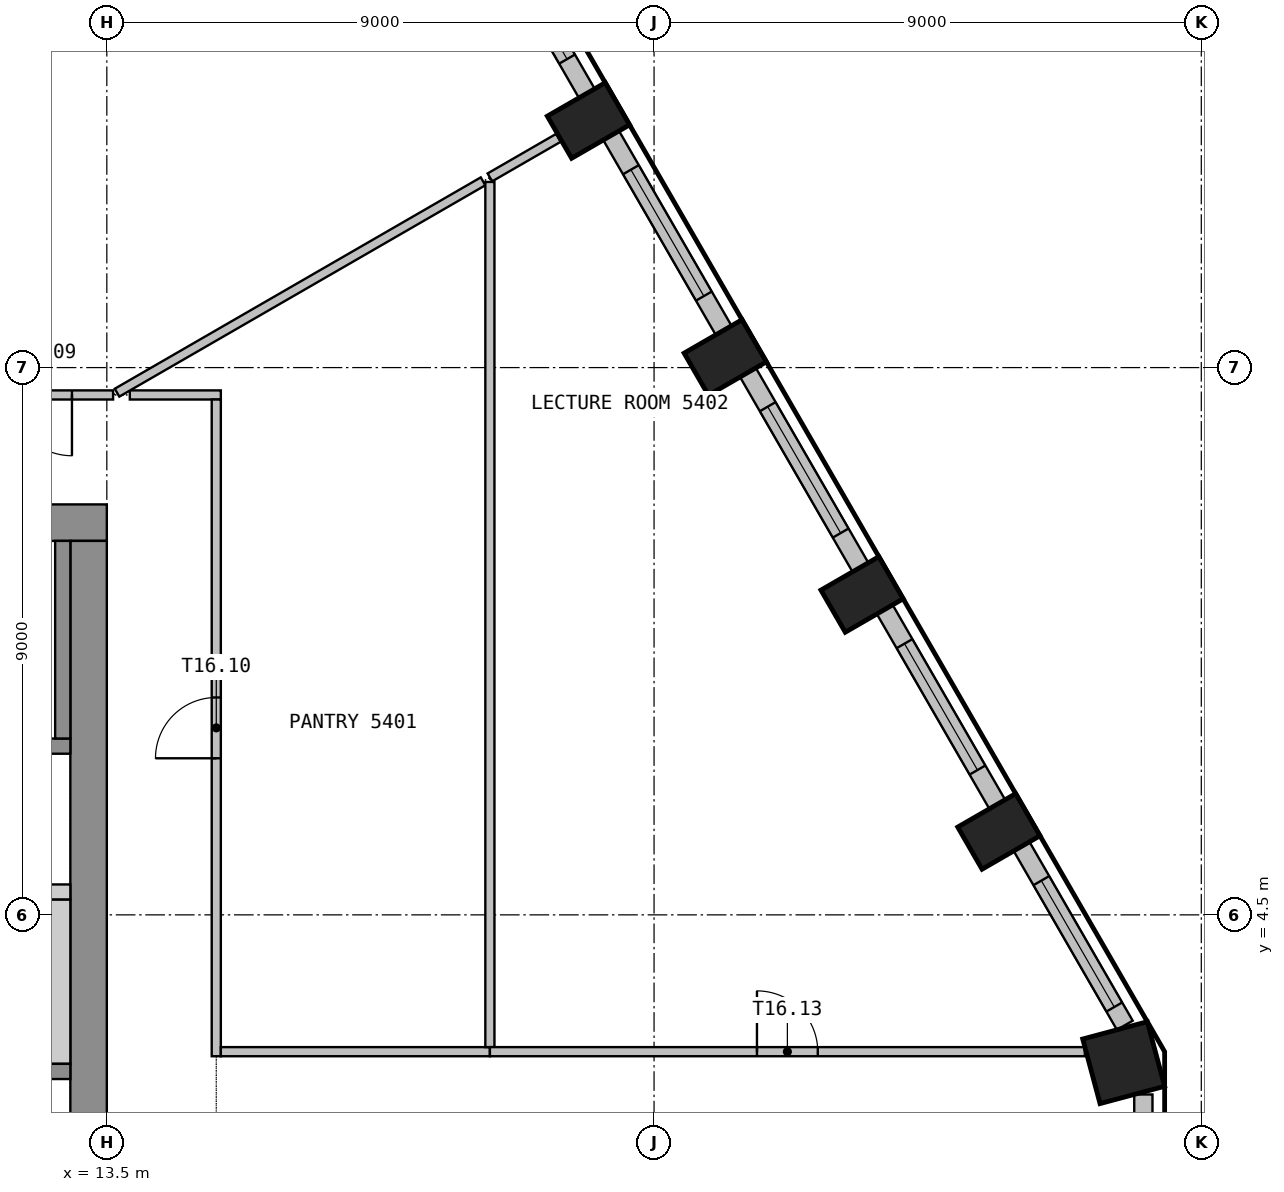
"""IFC4 building model, lengths in metres.
Left out: names, types, materials, properties, quantities, classifications, styles, units other than length and angle.
Written with IfcOpenShell. Run it as: python <this file> out.ifc"""

import sys

from ifc_helpers import new_model, si_unit, direction, frame, frame_2d, origin, origin_2d, place, context, subcontext, project, spatial, polyline, rectangle, outline, extrude, element, fill, save


model = new_model("IFC4")
c1 = context("Model", 3, precision=1e-05, world=origin(), true_north=direction((0.0, 1.0)))
c2 = subcontext(c1, "Body", "Model", "MODEL_VIEW")
j1 = project(units=[si_unit("LENGTHUNIT", "METRE"), si_unit("PLANEANGLEUNIT", "RADIAN")], contexts=[c1])
p1 = place(None, origin())
s1 = spatial("IfcSite", under=j1, at=p1, CompositionType="ELEMENT")
p2 = place(p1, origin())
s2 = spatial("IfcBuilding", under=s1, at=p2, CompositionType="ELEMENT")
p3 = place(p2, frame((0.0, 0.0, 219.0)))
s3 = spatial("IfcBuildingStorey", under=s2, at=p3, CompositionType="ELEMENT", Elevation=219.0)
p4 = place(p3, frame((30.223, 2.07, 0.0), z_axis=(0.0, 0.0, 1.0), x_axis=(-0.258819045103, 0.965925826289, 0.0)))
e1 = element("IfcColumn", 1, at=p4, inside=s3, PredefinedType="COLUMN", context=c2, shape_type="SweptSolid", body=[
    extrude(rectangle(XDim=1.1, YDim=1.1, at=origin_2d()), origin(), (0.0, 0.0, 1.0), 3.55),
])
for number, where, z_axis, x_axis in (
    (2, (28.171, 5.872, 0.0), (0.0, 0.0, 1.0), (-0.5, 0.866, 0.0)),
    (3, (25.921, 9.769, 0.0), (0.0, 0.0, 1.0), (-0.5, 0.866, 0.0)),
    (4, (23.671, 13.666, 0.0), (0.0, 0.0, 1.0), (-0.5, 0.866, 0.0)),
    (5, (21.421, 17.563, 0.0), (0.0, 0.0, 1.0), (-0.5, 0.866, 0.0)),
):
    element("IfcColumn", number, at=place(p3, frame(where, z_axis=z_axis, x_axis=x_axis)), inside=s3, PredefinedType="COLUMN", context=c2, shape_type="SweptSolid", body=[
        extrude(rectangle(XDim=0.8, YDim=1.1, at=origin_2d()), origin(), (0.0, 0.0, 1.0), 3.55),
    ])
p5 = place(p3, frame((30.547, -1.546, 0.0), z_axis=(0.0, 0.0, 1.0), x_axis=(0.0, 1.0, 0.0)))
e6 = element("IfcWall", 6, at=p5, inside=s3, PredefinedType="SOLIDWALL", context=c2, shape_type="SweptSolid", body=[
    extrude(rectangle(XDim=3.093, YDim=0.3, at=frame_2d((1.546, 0.0))), origin(), (0.0, 0.0, 1.0), 3.55),
])
p6 = place(p5, frame((0.346, 0.0, 0.9)))
e7 = element("IfcOpeningElement", 7, at=p6, cuts=e6, PredefinedType="OPENING", context=c2, shape_type="SweptSolid", body=[
    extrude(rectangle(XDim=2.4, YDim=2.1, at=frame_2d((1.2, 1.05))), frame((0.0, 0.16, 0.0), z_axis=(0.0, -1.0, 0.0), x_axis=(1.0, 0.0, 0.0)), (0.0, 0.0, 1.0), 0.32),
])
p7 = place(p3, frame((30.242, 2.684, 0.0), z_axis=(0.0, 0.0, 1.0), x_axis=(-0.500012868213, 0.866017974191, 0.0)))
e8 = element("IfcWall", 8, at=p7, inside=s3, PredefinedType="SOLIDWALL", context=c2, shape_type="SweptSolid", body=[
    extrude(rectangle(XDim=3.396, YDim=0.3, at=frame_2d((1.698, 0.0))), origin(), (0.0, 0.0, 1.0), 3.55),
])
p8 = place(p7, frame((0.346, 0.0, 0.9)))
e9 = element("IfcOpeningElement", 9, at=p8, cuts=e8, PredefinedType="OPENING", context=c2, shape_type="SweptSolid", body=[
    extrude(rectangle(XDim=2.4, YDim=2.1, at=frame_2d((1.2, 1.05))), frame((0.0, 0.16, 0.0), z_axis=(0.0, -1.0, 0.0), x_axis=(1.0, 0.0, 0.0)), (0.0, 0.0, 1.0), 0.32),
])
p9 = place(p3, frame((28.144, 6.319, 0.0), z_axis=(0.0, 0.0, 1.0), x_axis=(-0.500029062817, 0.866008623709, 0.0)))
e10 = element("IfcWall", 10, at=p9, inside=s3, PredefinedType="SOLIDWALL", context=c2, shape_type="SweptSolid", body=[
    extrude(rectangle(XDim=3.699, YDim=0.3, at=frame_2d((1.85, 0.0))), origin(), (0.0, 0.0, 1.0), 3.55),
])
p10 = place(p9, frame((0.649, 0.0, 0.9)))
e11 = element("IfcOpeningElement", 11, at=p10, cuts=e10, PredefinedType="OPENING", context=c2, shape_type="SweptSolid", body=[
    extrude(rectangle(XDim=2.4, YDim=2.1, at=frame_2d((1.2, 1.05))), frame((0.0, 0.16, 0.0), z_axis=(0.0, -1.0, 0.0), x_axis=(1.0, 0.0, 0.0)), (0.0, 0.0, 1.0), 0.32),
])
p11 = place(p3, frame((25.894, 10.216, 0.0), z_axis=(0.0, 0.0, 1.0), x_axis=(-0.500029062817, 0.866008623709, 0.0)))
e12 = element("IfcWall", 12, at=p11, inside=s3, PredefinedType="SOLIDWALL", context=c2, shape_type="SweptSolid", body=[
    extrude(rectangle(XDim=3.699, YDim=0.3, at=frame_2d((1.85, 0.0))), origin(), (0.0, 0.0, 1.0), 3.55),
])
p12 = place(p11, frame((0.649, 0.0, 0.9)))
e13 = element("IfcOpeningElement", 13, at=p12, cuts=e12, PredefinedType="OPENING", context=c2, shape_type="SweptSolid", body=[
    extrude(rectangle(XDim=2.4, YDim=2.1, at=frame_2d((1.2, 1.05))), frame((0.0, 0.16, 0.0), z_axis=(0.0, -1.0, 0.0), x_axis=(1.0, 0.0, 0.0)), (0.0, 0.0, 1.0), 0.32),
])
p13 = place(p3, frame((23.644, 14.113, 0.0), z_axis=(0.0, 0.0, 1.0), x_axis=(-0.500029062817, 0.866008623709, 0.0)))
e14 = element("IfcWall", 14, at=p13, inside=s3, PredefinedType="SOLIDWALL", context=c2, shape_type="SweptSolid", body=[
    extrude(rectangle(XDim=3.699, YDim=0.3, at=frame_2d((1.85, 0.0))), origin(), (0.0, 0.0, 1.0), 3.55),
])
p14 = place(p13, frame((0.649, 0.0, 0.9)))
e15 = element("IfcOpeningElement", 15, at=p14, cuts=e14, PredefinedType="OPENING", context=c2, shape_type="SweptSolid", body=[
    extrude(rectangle(XDim=2.4, YDim=2.1, at=frame_2d((1.2, 1.05))), frame((0.0, 0.16, 0.0), z_axis=(0.0, -1.0, 0.0), x_axis=(1.0, 0.0, 0.0)), (0.0, 0.0, 1.0), 0.32),
])
p15 = place(p3, frame((21.394, 18.01, 0.0), z_axis=(0.0, 0.0, 1.0), x_axis=(-0.500012868213, 0.866017974191, 0.0)))
e16 = element("IfcWall", 16, at=p15, inside=s3, PredefinedType="SOLIDWALL", context=c2, shape_type="SweptSolid", body=[
    extrude(rectangle(XDim=3.396, YDim=0.3, at=frame_2d((1.698, 0.0))), origin(), (0.0, 0.0, 1.0), 3.55),
])
p16 = place(p15, frame((0.649, 0.0, 0.9)))
e17 = element("IfcOpeningElement", 17, at=p16, cuts=e16, PredefinedType="OPENING", context=c2, shape_type="SweptSolid", body=[
    extrude(rectangle(XDim=2.4, YDim=2.1, at=frame_2d((1.2, 1.05))), frame((0.0, 0.16, 0.0), z_axis=(0.0, -1.0, 0.0), x_axis=(1.0, 0.0, 0.0)), (0.0, 0.0, 1.0), 0.32),
])
p17 = place(p3, frame((-13.5, 10.95, 0.0), z_axis=(0.0, 0.0, 1.0), x_axis=(1.0, 0.0, 0.0)))
e18 = element("IfcWall", 18, at=p17, inside=s3, PredefinedType="SHEAR", context=c2, shape_type="SweptSolid", body=[
    extrude(rectangle(XDim=27.0, YDim=0.6, at=frame_2d((13.5, 0.0))), origin(), (0.0, 0.0, 1.0), 3.55),
])
p18 = place(p17, frame((12.3, 0.0, 0.0)))
e19 = element("IfcOpeningElement", 19, at=p18, cuts=e18, PredefinedType="OPENING", context=c2, shape_type="SweptSolid", body=[
    extrude(rectangle(XDim=2.4, YDim=2.1, at=frame_2d((1.2, 1.05))), frame((0.0, 0.31, 0.0), z_axis=(0.0, -1.0, 0.0), x_axis=(1.0, 0.0, 0.0)), (0.0, 0.0, 1.0), 0.62),
])
p19 = place(p17, frame((1.05, 0.0, 0.0)))
e20 = element("IfcOpeningElement", 20, at=p19, cuts=e18, PredefinedType="OPENING", context=c2, shape_type="SweptSolid", body=[
    extrude(rectangle(XDim=1.2, YDim=2.1, at=frame_2d((0.6, 1.05))), frame((0.0, 0.31, 0.0), z_axis=(0.0, -1.0, 0.0), x_axis=(1.0, 0.0, 0.0)), (0.0, 0.0, 1.0), 0.62),
])
p20 = place(p17, frame((24.75, 0.0, 0.0)))
e21 = element("IfcOpeningElement", 21, at=p20, cuts=e18, PredefinedType="OPENING", context=c2, shape_type="SweptSolid", body=[
    extrude(rectangle(XDim=1.2, YDim=2.1, at=frame_2d((0.6, 1.05))), frame((0.0, 0.31, 0.0), z_axis=(0.0, -1.0, 0.0), x_axis=(1.0, 0.0, 0.0)), (0.0, 0.0, 1.0), 0.62),
])
p21 = place(p3, frame((13.2, -10.65, 0.0), z_axis=(0.0, 0.0, 1.0), x_axis=(0.0, 1.0, 0.0)))
e22 = element("IfcWall", 22, at=p21, inside=s3, PredefinedType="SHEAR", context=c2, shape_type="SweptSolid", body=[
    extrude(rectangle(XDim=21.3, YDim=0.6, at=frame_2d((10.65, 0.0))), origin(), (0.0, 0.0, 1.0), 3.55),
])
p22 = place(p21, frame((9.45, 0.0, 0.0)))
e23 = element("IfcOpeningElement", 23, at=p22, cuts=e22, PredefinedType="OPENING", context=c2, shape_type="SweptSolid", body=[
    extrude(rectangle(XDim=2.4, YDim=2.1, at=frame_2d((1.2, 1.05))), frame((0.0, 0.31, 0.0), z_axis=(0.0, -1.0, 0.0), x_axis=(1.0, 0.0, 0.0)), (0.0, 0.0, 1.0), 0.62),
])
p23 = place(p3, origin())
e24 = element("IfcWall", 24, at=p23, inside=s3, PredefinedType="SHEAR", context=c2, shape_type="SweptSolid", body=[
    extrude(outline(polyline([(4.075, 4.75), (12.9, 4.75), (12.9, 5.0), (4.075, 5.0), (4.075, 4.75)])), origin(), (0.0, 0.0, 1.0), 3.55),
])
p24 = place(p3, origin())
e25 = element("IfcWall", 25, at=p24, inside=s3, PredefinedType="SHEAR", context=c2, shape_type="SweptSolid", body=[
    extrude(outline(polyline([(12.475, 2.05), (12.9, 2.05), (12.9, 4.75), (12.475, 4.75), (12.475, 2.05)])), origin(), (0.0, 0.0, 1.0), 3.55),
])
p25 = place(p3, frame((9.675, 1.925, 0.0), z_axis=(0.0, 0.0, 1.0), x_axis=(1.0, 0.0, 0.0)))
e26 = element("IfcWall", 26, at=p25, inside=s3, PredefinedType="SHEAR", context=c2, shape_type="SweptSolid", body=[
    extrude(rectangle(XDim=3.225, YDim=0.25, at=frame_2d((1.612, 0.0))), origin(), (0.0, 0.0, 1.0), 3.55),
])
p26 = place(p25, frame((0.925, 0.0, 0.0)))
e27 = element("IfcOpeningElement", 27, at=p26, cuts=e26, PredefinedType="OPENING", context=c2, shape_type="SweptSolid", body=[
    extrude(rectangle(XDim=1.2, YDim=2.1, at=frame_2d((0.6, 1.05))), frame((0.0, 0.135, 0.0), z_axis=(0.0, -1.0, 0.0), x_axis=(1.0, 0.0, 0.0)), (0.0, 0.0, 1.0), 0.27),
])
p27 = place(p3, frame((2.8, 7.275, 0.0), z_axis=(0.0, 0.0, 1.0), x_axis=(1.0, 0.0, 0.0)))
e28 = element("IfcWall", 28, at=p27, inside=s3, PredefinedType="SHEAR", context=c2, shape_type="SweptSolid", body=[
    extrude(rectangle(XDim=10.1, YDim=0.25, at=frame_2d((5.05, 0.0))), origin(), (0.0, 0.0, 1.0), 3.55),
])
p28 = place(p27, frame((8.45, 0.0, 0.0)))
e29 = element("IfcOpeningElement", 29, at=p28, cuts=e28, PredefinedType="OPENING", context=c2, shape_type="SweptSolid", body=[
    extrude(rectangle(XDim=1.2, YDim=2.1, at=frame_2d((0.6, 1.05))), frame((0.0, 0.135, 0.0), z_axis=(0.0, -1.0, 0.0), x_axis=(1.0, 0.0, 0.0)), (0.0, 0.0, 1.0), 0.27),
])
p29 = place(p3, frame((12.775, 7.4, 0.0), z_axis=(0.0, 0.0, 1.0), x_axis=(0.0, 1.0, 0.0)))
e30 = element("IfcWall", 30, at=p29, inside=s3, PredefinedType="SHEAR", context=c2, shape_type="SweptSolid", body=[
    extrude(rectangle(XDim=3.25, YDim=0.25, at=frame_2d((1.625, 0.0))), origin(), (0.0, 0.0, 1.0), 3.55),
])
p30 = place(p3, frame((13.603, 13.05, 0.0), z_axis=(0.0, 0.0, 1.0), x_axis=(-1.0, 0.0, 0.0)))
e31 = element("IfcWall", 31, at=p30, inside=s3, PredefinedType="PARTITIONING", context=c2, shape_type="SweptSolid", body=[
    extrude(rectangle(XDim=2.353, YDim=0.15, at=frame_2d((1.177, 0.0))), origin(), (0.0, 0.0, 1.0), 3.55),
])
p31 = place(p30, frame((0.677, 0.0, 0.0)))
e32 = element("IfcOpeningElement", 32, at=p31, cuts=e31, PredefinedType="OPENING", context=c2, shape_type="SweptSolid", body=[
    extrude(rectangle(XDim=1.0, YDim=2.1, at=frame_2d((0.5, 1.05))), frame((0.0, 0.085, 0.0), z_axis=(0.0, -1.0, 0.0), x_axis=(1.0, 0.0, 0.0)), (0.0, 0.0, 1.0), 0.17),
])
p32 = place(p3, frame((15.375, 13.05, 0.0), z_axis=(0.0, 0.0, 1.0), x_axis=(-1.0, 0.0, 0.0)))
e33 = element("IfcWall", 33, at=p32, inside=s3, PredefinedType="PARTITIONING", context=c2, shape_type="SweptSolid", body=[
    extrude(rectangle(XDim=1.497, YDim=0.15, at=frame_2d((0.749, 0.0))), origin(), (0.0, 0.0, 1.0), 3.55),
])
p33 = place(p3, frame((19.688, 16.563, 0.0), z_axis=(0.0, 0.0, 1.0), x_axis=(-0.866012448988, -0.500022437694, 0.0)))
e34 = element("IfcWall", 34, at=p33, inside=s3, PredefinedType="PARTITIONING", context=c2, shape_type="SweptSolid", body=[
    extrude(rectangle(XDim=6.951, YDim=0.15, at=frame_2d((3.476, 0.0))), origin(), (0.0, 0.0, 1.0), 3.55),
])
p34 = place(p3, frame((15.3, 2.175, 0.0), z_axis=(0.0, 0.0, 1.0), x_axis=(0.0, 1.0, 0.0)))
e35 = element("IfcWall", 35, at=p34, inside=s3, PredefinedType="PARTITIONING", context=c2, shape_type="SweptSolid", body=[
    extrude(rectangle(XDim=10.8, YDim=0.15, at=frame_2d((5.4, 0.0))), origin(), (0.0, 0.0, 1.0), 3.55),
])
p35 = place(p34, frame((4.9, 0.0, 0.0)))
e36 = element("IfcOpeningElement", 36, at=p35, cuts=e35, PredefinedType="OPENING", context=c2, shape_type="SweptSolid", body=[
    extrude(rectangle(XDim=1.0, YDim=2.1, at=frame_2d((0.5, 1.05))), frame((0.0, 0.085, 0.0), z_axis=(0.0, -1.0, 0.0), x_axis=(1.0, 0.0, 0.0)), (0.0, 0.0, 1.0), 0.17),
])
p36 = place(p3, frame((15.375, 2.25, 0.0), z_axis=(0.0, 0.0, 1.0), x_axis=(1.0, 0.0, 0.0)))
e37 = element("IfcWall", 37, at=p36, inside=s3, PredefinedType="PARTITIONING", context=c2, shape_type="SweptSolid", body=[
    extrude(rectangle(XDim=4.425, YDim=0.15, at=frame_2d((2.212, 0.0))), origin(), (0.0, 0.0, 1.0), 3.55),
])
p37 = place(p3, frame((19.8, 16.553, 0.0), z_axis=(0.0, 0.0, 1.0), x_axis=(0.0, -1.0, 0.0)))
e38 = element("IfcWall", 38, at=p37, inside=s3, PredefinedType="PARTITIONING", context=c2, shape_type="SweptSolid", body=[
    extrude(rectangle(XDim=14.228, YDim=0.15, at=frame_2d((7.114, 0.0))), origin(), (0.0, 0.0, 1.0), 3.55),
])
p38 = place(p3, frame((19.8, 2.25, 0.0), z_axis=(0.0, 0.0, 1.0), x_axis=(1.0, 0.0, 0.0)))
e39 = element("IfcWall", 39, at=p38, inside=s3, PredefinedType="PARTITIONING", context=c2, shape_type="SweptSolid", body=[
    extrude(rectangle(XDim=9.785, YDim=0.15, at=frame_2d((4.893, 0.0))), origin(), (0.0, 0.0, 1.0), 3.55),
])
p39 = place(p38, frame((4.393, 0.0, 0.0)))
e40 = element("IfcOpeningElement", 40, at=p39, cuts=e39, PredefinedType="OPENING", context=c2, shape_type="SweptSolid", body=[
    extrude(rectangle(XDim=1.0, YDim=2.1, at=frame_2d((0.5, 1.05))), frame((0.0, 0.085, 0.0), z_axis=(0.0, -1.0, 0.0), x_axis=(1.0, 0.0, 0.0)), (0.0, 0.0, 1.0), 0.17),
])
p40 = place(p3, frame((20.927, 17.278, 0.0), z_axis=(0.0, 0.0, 1.0), x_axis=(-0.866157475642, -0.499771175029, 0.0)))
e41 = element("IfcWall", 41, at=p40, inside=s3, PredefinedType="MOVABLE", context=c2, shape_type="SweptSolid", body=[
    extrude(rectangle(XDim=1.301, YDim=0.15, at=frame_2d((0.651, 0.0))), origin(), (0.0, 0.0, 1.0), 3.55),
])
p41 = place(p8, origin())
e42 = element("IfcWindow", 42, at=p41, inside=s3, PartitioningType="SINGLE_PANEL", PredefinedType="WINDOW", context=c2, shape_type="SweptSolid", body=[
    extrude(rectangle(XDim=2.4, YDim=2.1, at=frame_2d((1.2, 1.05))), frame((0.0, 0.03, 0.0), z_axis=(0.0, -1.0, 0.0), x_axis=(1.0, 0.0, 0.0)), (0.0, 0.0, 1.0), 0.06),
])
fill(e9, e42)
p42 = place(p10, origin())
e43 = element("IfcWindow", 43, at=p42, inside=s3, PartitioningType="SINGLE_PANEL", PredefinedType="WINDOW", context=c2, shape_type="SweptSolid", body=[
    extrude(rectangle(XDim=2.4, YDim=2.1, at=frame_2d((1.2, 1.05))), frame((0.0, 0.03, 0.0), z_axis=(0.0, -1.0, 0.0), x_axis=(1.0, 0.0, 0.0)), (0.0, 0.0, 1.0), 0.06),
])
fill(e11, e43)
p43 = place(p12, origin())
e44 = element("IfcWindow", 44, at=p43, inside=s3, PartitioningType="SINGLE_PANEL", PredefinedType="WINDOW", context=c2, shape_type="SweptSolid", body=[
    extrude(rectangle(XDim=2.4, YDim=2.1, at=frame_2d((1.2, 1.05))), frame((0.0, 0.03, 0.0), z_axis=(0.0, -1.0, 0.0), x_axis=(1.0, 0.0, 0.0)), (0.0, 0.0, 1.0), 0.06),
])
fill(e13, e44)
p44 = place(p14, origin())
e45 = element("IfcWindow", 45, at=p44, inside=s3, PartitioningType="SINGLE_PANEL", PredefinedType="WINDOW", context=c2, shape_type="SweptSolid", body=[
    extrude(rectangle(XDim=2.4, YDim=2.1, at=frame_2d((1.2, 1.05))), frame((0.0, 0.03, 0.0), z_axis=(0.0, -1.0, 0.0), x_axis=(1.0, 0.0, 0.0)), (0.0, 0.0, 1.0), 0.06),
])
fill(e15, e45)
p45 = place(p16, origin())
e46 = element("IfcWindow", 46, at=p45, inside=s3, PartitioningType="SINGLE_PANEL", PredefinedType="WINDOW", context=c2, shape_type="SweptSolid", body=[
    extrude(rectangle(XDim=2.4, YDim=2.1, at=frame_2d((1.2, 1.05))), frame((0.0, 0.03, 0.0), z_axis=(0.0, -1.0, 0.0), x_axis=(1.0, 0.0, 0.0)), (0.0, 0.0, 1.0), 0.06),
])
fill(e17, e46)
p46 = place(p31, origin())
e47 = element("IfcDoor", 47, at=p46, inside=s3, OperationType="SINGLE_SWING_LEFT", PredefinedType="DOOR", context=c2, shape_type="SweptSolid", body=[
    extrude(rectangle(XDim=1.0, YDim=2.1, at=frame_2d((0.5, 1.05))), frame((0.0, 0.025, 0.0), z_axis=(0.0, -1.0, 0.0), x_axis=(1.0, 0.0, 0.0)), (0.0, 0.0, 1.0), 0.05),
])
fill(e32, e47)
p47 = place(p35, origin())
e48 = element("IfcDoor", 48, at=p47, inside=s3, OperationType="SINGLE_SWING_RIGHT", PredefinedType="DOOR", context=c2, shape_type="SweptSolid", body=[
    extrude(rectangle(XDim=1.0, YDim=2.1, at=frame_2d((0.5, 1.05))), frame((0.0, 0.025, 0.0), z_axis=(0.0, -1.0, 0.0), x_axis=(1.0, 0.0, 0.0)), (0.0, 0.0, 1.0), 0.05),
])
fill(e36, e48)
p48 = place(p39, origin())
e49 = element("IfcDoor", 49, at=p48, inside=s3, OperationType="SINGLE_SWING_RIGHT", PredefinedType="DOOR", context=c2, shape_type="SweptSolid", body=[
    extrude(rectangle(XDim=1.0, YDim=2.1, at=frame_2d((0.5, 1.05))), frame((0.0, 0.025, 0.0), z_axis=(0.0, -1.0, 0.0), x_axis=(1.0, 0.0, 0.0)), (0.0, 0.0, 1.0), 0.05),
])
fill(e40, e49)
save(model, sys.argv[1])
